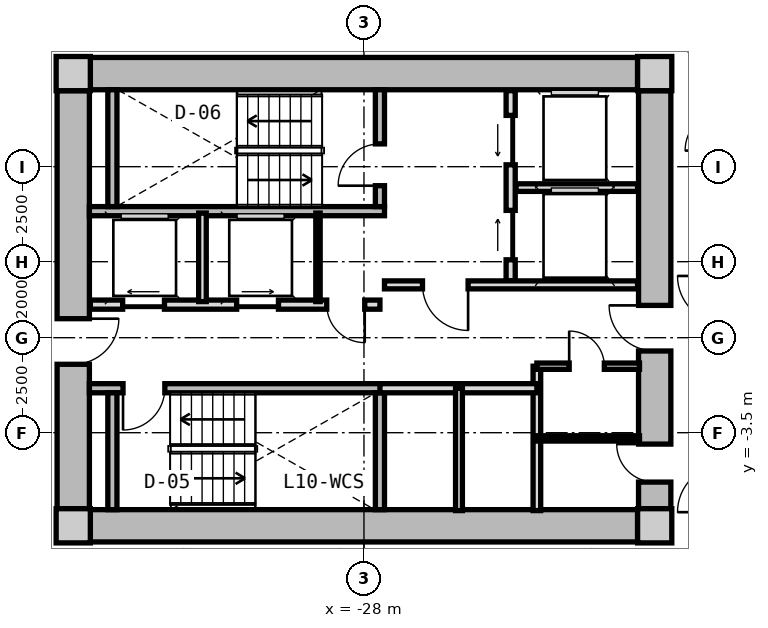
"""IFC4 building model, lengths in metres.
Left out: names, types, materials, properties, quantities, classifications, styles, units other than length and angle.
Written with IfcOpenShell. Run it as: python <this file> out.ifc"""

import sys

from ifc_helpers import new_model, si_unit, direction, frame, frame_2d, origin, origin_2d, place, context, subcontext, project, spatial, rectangle, extrude, source, transform, mapped, element, fill, save


model = new_model("IFC4")
c1 = context("Model", 3, precision=1e-05, world=origin(), true_north=direction((0.0, 1.0)))
c2 = subcontext(c1, "Body", "Model", "MODEL_VIEW")
j1 = project(units=[si_unit("LENGTHUNIT", "METRE"), si_unit("PLANEANGLEUNIT", "RADIAN")], contexts=[c1])
p1 = place(None, origin())
s1 = spatial("IfcSite", under=j1, at=p1, CompositionType="ELEMENT")
p2 = place(p1, origin())
s2 = spatial("IfcBuilding", under=s1, at=p2, CompositionType="ELEMENT")
p3 = place(p2, frame((0.0, 0.0, 36.85)))
s3 = spatial("IfcBuildingStorey", under=s2, at=p3, CompositionType="ELEMENT", Elevation=36.85)
m1 = source(origin(), c2, "Body", "SweptSolid", [
    extrude(rectangle(XDim=0.9, YDim=0.9, at=origin_2d()), origin(), (0.0, 0.0, 1.0), 3.05),
])
for number, where, z_axis, x_axis in (
    (1, (-35.65, -5.95, 0.0), (0.0, 0.0, 1.0), (1.0, 0.0, 0.0)),
    (2, (-20.35, -5.95, 0.0), (0.0, 0.0, 1.0), (1.0, 0.0, 0.0)),
    (3, (-20.35, 5.95, 0.0), (0.0, 0.0, 1.0), (1.0, 0.0, 0.0)),
    (4, (-35.65, 5.95, 0.0), (0.0, 0.0, 1.0), (1.0, 0.0, 0.0)),
):
    element("IfcColumn", number, at=place(p3, frame(where, z_axis=z_axis, x_axis=x_axis)), inside=s3, PredefinedType="COLUMN", context=c2, shape_type="MappedRepresentation", body=[
        mapped(m1, transform((0.0, 0.0, 0.0), x_axis=(1.0, 0.0, 0.0), y_axis=(0.0, 1.0, 0.0), z_axis=(0.0, 0.0, 1.0), scale=1.0)),
    ])
m2 = source(origin(), c2, "Body", "SweptSolid", [
    extrude(rectangle(XDim=14.4, YDim=0.85, at=frame_2d((7.2, 0.0))), origin(), (0.0, 0.0, 1.0), 2.79),
])
for number, where, z_axis, x_axis in (
    (5, (-35.2, 5.95, 0.0), (0.0, 0.0, 1.0), (1.0, 0.0, 0.0)),
    (6, (-20.8, -5.95, 0.0), (0.0, 0.0, 1.0), (-1.0, 0.0, 0.0)),
):
    element("IfcWall", number, at=place(p3, frame(where, z_axis=z_axis, x_axis=x_axis)), inside=s3, PredefinedType="SHEAR", context=c2, shape_type="MappedRepresentation", body=[
        mapped(m2, transform((0.0, 0.0, 0.0), x_axis=(1.0, 0.0, 0.0), y_axis=(0.0, 1.0, 0.0), z_axis=(0.0, 0.0, 1.0), scale=1.0)),
    ])
m3 = source(origin(), c2, "Body", "SweptSolid", [
    extrude(rectangle(XDim=11.0, YDim=0.85, at=frame_2d((5.5, 0.0))), origin(), (0.0, 0.0, 1.0), 2.79),
])
p4 = place(p3, frame((-35.65, -5.5, 0.0), z_axis=(0.0, 0.0, 1.0), x_axis=(0.0, 1.0, 0.0)))
e7 = element("IfcWall", 7, at=p4, inside=s3, PredefinedType="SHEAR", context=c2, shape_type="MappedRepresentation", body=[
    mapped(m3, transform((0.0, 0.0, 0.0), x_axis=(1.0, 0.0, 0.0), y_axis=(0.0, 1.0, 0.0), z_axis=(0.0, 0.0, 1.0), scale=1.0)),
])
p5 = place(p4, frame((3.8, 0.0, 0.0)))
e8 = element("IfcOpeningElement", 8, at=p5, cuts=e7, PredefinedType="OPENING", context=c2, shape_type="SweptSolid", body=[
    extrude(rectangle(XDim=1.2, YDim=2.15, at=frame_2d((0.6, 1.075))), frame((0.0, 0.435, 0.0), z_axis=(0.0, -1.0, 0.0), x_axis=(1.0, 0.0, 0.0)), (0.0, 0.0, 1.0), 0.87),
])
p6 = place(p3, frame((-20.35, 5.5, 0.0), z_axis=(0.0, 0.0, 1.0), x_axis=(0.0, -1.0, 0.0)))
e9 = element("IfcWall", 9, at=p6, inside=s3, PredefinedType="SHEAR", context=c2, shape_type="MappedRepresentation", body=[
    mapped(m3, transform((0.0, 0.0, 0.0), x_axis=(1.0, 0.0, 0.0), y_axis=(0.0, 1.0, 0.0), z_axis=(0.0, 0.0, 1.0), scale=1.0)),
])
p7 = place(p6, frame((5.65, 0.0, 0.0)))
e10 = element("IfcOpeningElement", 10, at=p7, cuts=e9, PredefinedType="OPENING", context=c2, shape_type="SweptSolid", body=[
    extrude(rectangle(XDim=1.2, YDim=2.15, at=frame_2d((0.6, 1.075))), frame((0.0, 0.435, 0.0), z_axis=(0.0, -1.0, 0.0), x_axis=(1.0, 0.0, 0.0)), (0.0, 0.0, 1.0), 0.87),
])
p8 = place(p6, frame((9.3, 0.0, 0.0)))
e11 = element("IfcOpeningElement", 11, at=p8, cuts=e9, PredefinedType="OPENING", context=c2, shape_type="SweptSolid", body=[
    extrude(rectangle(XDim=1.0, YDim=2.1, at=frame_2d((0.5, 1.05))), frame((0.0, 0.435, 0.0), z_axis=(0.0, -1.0, 0.0), x_axis=(1.0, 0.0, 0.0)), (0.0, 0.0, 1.0), 0.87),
])
m4 = source(origin(), c2, "Body", "SweptSolid", [
    extrude(rectangle(XDim=7.765, YDim=0.24, at=frame_2d((3.883, 0.0))), origin(), (0.0, 0.0, 1.0), 2.79),
])
p9 = place(p3, frame((-35.225, 2.33, 0.0), z_axis=(0.0, 0.0, 1.0), x_axis=(1.0, 0.0, 0.0)))
e12 = element("IfcWall", 12, at=p9, inside=s3, PredefinedType="PARTITIONING", context=c2, shape_type="MappedRepresentation", body=[
    mapped(m4, transform((0.0, 0.0, 0.0), x_axis=(1.0, 0.0, 0.0), y_axis=(0.0, 1.0, 0.0), z_axis=(0.0, 0.0, 1.0), scale=1.0)),
])
m5 = source(origin(), c2, "Body", "SweptSolid", [
    extrude(rectangle(XDim=3.075, YDim=0.24, at=frame_2d((1.538, 0.0))), origin(), (0.0, 0.0, 1.0), 2.79),
])
p10 = place(p3, frame((-34.62, 2.45, 0.0), z_axis=(0.0, 0.0, 1.0), x_axis=(0.0, 1.0, 0.0)))
e13 = element("IfcWall", 13, at=p10, inside=s3, PredefinedType="PARTITIONING", context=c2, shape_type="MappedRepresentation", body=[
    mapped(m5, transform((0.0, 0.0, 0.0), x_axis=(1.0, 0.0, 0.0), y_axis=(0.0, 1.0, 0.0), z_axis=(0.0, 0.0, 1.0), scale=1.0)),
])
p11 = place(p3, frame((-27.58, 2.45, 0.0), z_axis=(0.0, 0.0, 1.0), x_axis=(0.0, 1.0, 0.0)))
e14 = element("IfcWall", 14, at=p11, inside=s3, PredefinedType="PARTITIONING", context=c2, shape_type="MappedRepresentation", body=[
    mapped(m5, transform((0.0, 0.0, 0.0), x_axis=(1.0, 0.0, 0.0), y_axis=(0.0, 1.0, 0.0), z_axis=(0.0, 0.0, 1.0), scale=1.0)),
])
p12 = place(p11, frame((0.55, 0.0, 0.0)))
e15 = element("IfcOpeningElement", 15, at=p12, cuts=e14, PredefinedType="OPENING", context=c2, shape_type="SweptSolid", body=[
    extrude(rectangle(XDim=1.1, YDim=2.15, at=frame_2d((0.55, 1.075))), frame((0.0, 0.13, 0.0), z_axis=(0.0, -1.0, 0.0), x_axis=(1.0, 0.0, 0.0)), (0.0, 0.0, 1.0), 0.26),
])
p13 = place(p3, frame((-35.225, -2.33, 0.0), z_axis=(0.0, 0.0, 1.0), x_axis=(1.0, 0.0, 0.0)))
e16 = element("IfcWall", 16, at=p13, inside=s3, PredefinedType="PARTITIONING", context=c2, shape_type="MappedRepresentation", body=[
    mapped(m4, transform((0.0, 0.0, 0.0), x_axis=(1.0, 0.0, 0.0), y_axis=(0.0, 1.0, 0.0), z_axis=(0.0, 0.0, 1.0), scale=1.0)),
])
p14 = place(p13, frame((0.885, 0.0, 0.0)))
e17 = element("IfcOpeningElement", 17, at=p14, cuts=e16, PredefinedType="OPENING", context=c2, shape_type="SweptSolid", body=[
    extrude(rectangle(XDim=1.1, YDim=2.15, at=frame_2d((0.55, 1.075))), frame((0.0, 0.13, 0.0), z_axis=(0.0, -1.0, 0.0), x_axis=(1.0, 0.0, 0.0)), (0.0, 0.0, 1.0), 0.26),
])
for number, where, z_axis, x_axis in (
    (18, (-34.62, -5.525, 0.0), (0.0, 0.0, 1.0), (0.0, 1.0, 0.0)),
    (19, (-27.58, -5.525, 0.0), (0.0, 0.0, 1.0), (0.0, 1.0, 0.0)),
):
    element("IfcWall", number, at=place(p3, frame(where, z_axis=z_axis, x_axis=x_axis)), inside=s3, PredefinedType="PARTITIONING", context=c2, shape_type="MappedRepresentation", body=[
        mapped(m5, transform((0.0, 0.0, 0.0), x_axis=(1.0, 0.0, 0.0), y_axis=(0.0, 1.0, 0.0), z_axis=(0.0, 0.0, 1.0), scale=1.0)),
    ])
m6 = source(origin(), c2, "Body", "SweptSolid", [
    extrude(rectangle(XDim=5.0, YDim=0.24, at=frame_2d((2.5, 0.0))), origin(), (0.0, 0.0, 1.0), 2.775),
])
p15 = place(p3, frame((-24.14, 0.5, 0.0), z_axis=(0.0, 0.0, 1.0), x_axis=(0.0, 1.0, 0.0)))
e20 = element("IfcWall", 20, at=p15, inside=s3, PredefinedType="PARTITIONING", context=c2, shape_type="MappedRepresentation", body=[
    mapped(m6, transform((0.0, 0.0, 0.0), x_axis=(1.0, 0.0, 0.0), y_axis=(0.0, 1.0, 0.0), z_axis=(0.0, 0.0, 1.0), scale=1.0)),
])
p16 = place(p15, frame((3.05, 0.0, 0.0)))
e21 = element("IfcOpeningElement", 21, at=p16, cuts=e20, PredefinedType="OPENING", context=c2, shape_type="SweptSolid", body=[
    extrude(rectangle(XDim=1.3, YDim=2.2, at=frame_2d((0.65, 1.1))), frame((0.0, 0.13, 0.0), z_axis=(0.0, -1.0, 0.0), x_axis=(1.0, 0.0, 0.0)), (0.0, 0.0, 1.0), 0.26),
])
p17 = place(p15, frame((0.55, 0.0, 0.0)))
e22 = element("IfcOpeningElement", 22, at=p17, cuts=e20, PredefinedType="OPENING", context=c2, shape_type="SweptSolid", body=[
    extrude(rectangle(XDim=1.3, YDim=2.2, at=frame_2d((0.65, 1.1))), frame((0.0, 0.13, 0.0), z_axis=(0.0, -1.0, 0.0), x_axis=(1.0, 0.0, 0.0)), (0.0, 0.0, 1.0), 0.26),
])
m7 = source(origin(), c2, "Body", "SweptSolid", [
    extrude(rectangle(XDim=3.2, YDim=0.2, at=frame_2d((1.6, 0.0))), origin(), (0.0, 0.0, 1.0), 2.775),
])
p18 = place(p3, frame((-24.0, 2.95, 0.0), z_axis=(0.0, 0.0, 1.0), x_axis=(1.0, 0.0, 0.0)))
e23 = element("IfcWall", 23, at=p18, inside=s3, PredefinedType="PARTITIONING", context=c2, shape_type="MappedRepresentation", body=[
    mapped(m7, transform((0.0, 0.0, 0.0), x_axis=(1.0, 0.0, 0.0), y_axis=(0.0, 1.0, 0.0), z_axis=(0.0, 0.0, 1.0), scale=1.0)),
])
m8 = source(origin(), c2, "Body", "SweptSolid", [
    extrude(rectangle(XDim=6.66, YDim=0.21, at=frame_2d((3.33, 0.0))), origin(), (0.0, 0.0, 1.0), 2.775),
])
p19 = place(p3, frame((-27.46, 0.39, 0.0), z_axis=(0.0, 0.0, 1.0), x_axis=(1.0, 0.0, 0.0)))
e24 = element("IfcWall", 24, at=p19, inside=s3, PredefinedType="PARTITIONING", context=c2, shape_type="MappedRepresentation", body=[
    mapped(m8, transform((0.0, 0.0, 0.0), x_axis=(1.0, 0.0, 0.0), y_axis=(0.0, 1.0, 0.0), z_axis=(0.0, 0.0, 1.0), scale=1.0)),
])
p20 = place(p19, frame((1.0, 0.0, 0.0)))
e25 = element("IfcOpeningElement", 25, at=p20, cuts=e24, PredefinedType="OPENING", context=c2, shape_type="SweptSolid", body=[
    extrude(rectangle(XDim=1.2, YDim=2.15, at=frame_2d((0.6, 1.075))), frame((0.0, 0.115, 0.0), z_axis=(0.0, -1.0, 0.0), x_axis=(1.0, 0.0, 0.0)), (0.0, 0.0, 1.0), 0.23),
])
m9 = source(origin(), c2, "Body", "SweptSolid", [
    extrude(rectangle(XDim=7.62, YDim=0.24, at=frame_2d((3.81, 0.0))), origin(), (0.0, 0.0, 1.0), 2.775),
])
p21 = place(p3, frame((-35.2, -0.13, 0.0), z_axis=(0.0, 0.0, 1.0), x_axis=(1.0, 0.0, 0.0)))
e26 = element("IfcWall", 26, at=p21, inside=s3, PredefinedType="PARTITIONING", context=c2, shape_type="MappedRepresentation", body=[
    mapped(m9, transform((0.0, 0.0, 0.0), x_axis=(1.0, 0.0, 0.0), y_axis=(0.0, 1.0, 0.0), z_axis=(0.0, 0.0, 1.0), scale=1.0)),
])
p22 = place(p21, frame((6.22, 0.0, 0.0)))
e27 = element("IfcOpeningElement", 27, at=p22, cuts=e26, PredefinedType="OPENING", context=c2, shape_type="SweptSolid", body=[
    extrude(rectangle(XDim=1.0, YDim=2.1, at=frame_2d((0.5, 1.05))), frame((0.0, 0.13, 0.0), z_axis=(0.0, -1.0, 0.0), x_axis=(1.0, 0.0, 0.0)), (0.0, 0.0, 1.0), 0.26),
])
p23 = place(p21, frame((0.85, 0.0, 0.0)))
e28 = element("IfcOpeningElement", 28, at=p23, cuts=e26, PredefinedType="OPENING", context=c2, shape_type="SweptSolid", body=[
    extrude(rectangle(XDim=1.1, YDim=2.2, at=frame_2d((0.55, 1.1))), frame((0.0, 0.13, 0.0), z_axis=(0.0, -1.0, 0.0), x_axis=(1.0, 0.0, 0.0)), (0.0, 0.0, 1.0), 0.26),
])
p24 = place(p21, frame((3.85, 0.0, 0.0)))
e29 = element("IfcOpeningElement", 29, at=p24, cuts=e26, PredefinedType="OPENING", context=c2, shape_type="SweptSolid", body=[
    extrude(rectangle(XDim=1.1, YDim=2.2, at=frame_2d((0.55, 1.1))), frame((0.0, 0.13, 0.0), z_axis=(0.0, -1.0, 0.0), x_axis=(1.0, 0.0, 0.0)), (0.0, 0.0, 1.0), 0.26),
])
m10 = source(origin(), c2, "Body", "SweptSolid", [
    extrude(rectangle(XDim=2.33, YDim=0.115, at=frame_2d((1.165, 0.0))), origin(), (0.0, 0.0, 1.0), 2.775),
])
p25 = place(p3, frame((-29.21, -0.05, 0.0), z_axis=(0.0, 0.0, 1.0), x_axis=(0.0, 1.0, 0.0)))
e30 = element("IfcWall", 30, at=p25, inside=s3, PredefinedType="PARTITIONING", context=c2, shape_type="MappedRepresentation", body=[
    mapped(m10, transform((0.0, 0.0, 0.0), x_axis=(1.0, 0.0, 0.0), y_axis=(0.0, 1.0, 0.0), z_axis=(0.0, 0.0, 1.0), scale=1.0)),
])
m11 = source(origin(), c2, "Body", "SweptSolid", [
    extrude(rectangle(XDim=2.33, YDim=0.2, at=frame_2d((1.165, 0.0))), origin(), (0.0, 0.0, 1.0), 2.775),
])
p26 = place(p3, frame((-32.25, -0.05, 0.0), z_axis=(0.0, 0.0, 1.0), x_axis=(0.0, 1.0, 0.0)))
e31 = element("IfcWall", 31, at=p26, inside=s3, PredefinedType="PARTITIONING", context=c2, shape_type="MappedRepresentation", body=[
    mapped(m11, transform((0.0, 0.0, 0.0), x_axis=(1.0, 0.0, 0.0), y_axis=(0.0, 1.0, 0.0), z_axis=(0.0, 0.0, 1.0), scale=1.0)),
])
m12 = source(origin(), c2, "Body", "SweptSolid", [
    extrude(rectangle(XDim=3.8, YDim=0.2, at=frame_2d((1.9, 0.0))), origin(), (0.0, 0.0, 1.0), 2.775),
])
p27 = place(p3, frame((-23.45, -5.55, 0.0), z_axis=(0.0, 0.0, 1.0), x_axis=(0.0, 1.0, 0.0)))
e32 = element("IfcWall", 32, at=p27, inside=s3, PredefinedType="PARTITIONING", context=c2, shape_type="MappedRepresentation", body=[
    mapped(m12, transform((0.0, 0.0, 0.0), x_axis=(1.0, 0.0, 0.0), y_axis=(0.0, 1.0, 0.0), z_axis=(0.0, 0.0, 1.0), scale=1.0)),
])
m13 = source(origin(), c2, "Body", "SweptSolid", [
    extrude(rectangle(XDim=4.13, YDim=0.24, at=frame_2d((2.065, 0.0))), origin(), (0.0, 0.0, 1.0), 2.775),
])
p28 = place(p3, frame((-27.58, -2.33, 0.0), z_axis=(0.0, 0.0, 1.0), x_axis=(1.0, 0.0, 0.0)))
e33 = element("IfcWall", 33, at=p28, inside=s3, PredefinedType="PARTITIONING", context=c2, shape_type="MappedRepresentation", body=[
    mapped(m13, transform((0.0, 0.0, 0.0), x_axis=(1.0, 0.0, 0.0), y_axis=(0.0, 1.0, 0.0), z_axis=(0.0, 0.0, 1.0), scale=1.0)),
])
m14 = source(origin(), c2, "Body", "SweptSolid", [
    extrude(rectangle(XDim=3.22, YDim=0.18, at=frame_2d((1.61, 0.0))), origin(), (0.0, 0.0, 1.0), 2.775),
])
p29 = place(p3, frame((-25.5, -5.55, 0.0), z_axis=(0.0, 0.0, 1.0), x_axis=(0.0, 1.0, 0.0)))
e34 = element("IfcWall", 34, at=p29, inside=s3, PredefinedType="PARTITIONING", context=c2, shape_type="MappedRepresentation", body=[
    mapped(m14, transform((0.0, 0.0, 0.0), x_axis=(1.0, 0.0, 0.0), y_axis=(0.0, 1.0, 0.0), z_axis=(0.0, 0.0, 1.0), scale=1.0)),
])
m15 = source(origin(), c2, "Body", "SweptSolid", [
    extrude(rectangle(XDim=2.7, YDim=0.165, at=frame_2d((1.35, 0.0))), origin(), (0.0, 0.0, 1.0), 2.775),
])
p30 = place(p3, frame((-23.45, -1.75, 0.0), z_axis=(0.0, 0.0, 1.0), x_axis=(1.0, 0.0, 0.0)))
e35 = element("IfcWall", 35, at=p30, inside=s3, PredefinedType="PARTITIONING", context=c2, shape_type="MappedRepresentation", body=[
    mapped(m15, transform((0.0, 0.0, 0.0), x_axis=(1.0, 0.0, 0.0), y_axis=(0.0, 1.0, 0.0), z_axis=(0.0, 0.0, 1.0), scale=1.0)),
])
p31 = place(p30, frame((0.85, 0.0, 0.0)))
e36 = element("IfcOpeningElement", 36, at=p31, cuts=e35, PredefinedType="OPENING", context=c2, shape_type="SweptSolid", body=[
    extrude(rectangle(XDim=0.925, YDim=2.1, at=frame_2d((0.462, 1.05))), frame((0.0, 0.093, 0.0), z_axis=(0.0, -1.0, 0.0), x_axis=(1.0, 0.0, 0.0)), (0.0, 0.0, 1.0), 0.185),
])
m16 = source(origin(), c2, "Body", "SweptSolid", [
    extrude(rectangle(XDim=2.7, YDim=0.14, at=frame_2d((1.35, 0.0))), origin(), (0.0, 0.0, 1.0), 2.775),
])
p32 = place(p3, frame((-23.45, -3.65, 0.0), z_axis=(0.0, 0.0, 1.0), x_axis=(1.0, 0.0, 0.0)))
e37 = element("IfcWall", 37, at=p32, inside=s3, PredefinedType="PARTITIONING", context=c2, shape_type="MappedRepresentation", body=[
    mapped(m16, transform((0.0, 0.0, 0.0), x_axis=(1.0, 0.0, 0.0), y_axis=(0.0, 1.0, 0.0), z_axis=(0.0, 0.0, 1.0), scale=1.0)),
])
m17 = source(origin(), c2, "Body", "SweptSolid", [
    extrude(rectangle(XDim=1.1, YDim=2.15, at=frame_2d((0.55, 1.075))), frame((0.0, 0.025, 0.0), z_axis=(0.0, -1.0, 0.0), x_axis=(1.0, 0.0, 0.0)), (0.0, 0.0, 1.0), 0.05),
])
p33 = place(p12, origin())
e38 = element("IfcDoor", 38, at=p33, inside=s3, OperationType="SINGLE_SWING_LEFT", PredefinedType="DOOR", context=c2, shape_type="MappedRepresentation", body=[
    mapped(m17, transform((0.0, 0.0, 0.0), x_axis=(1.0, 0.0, 0.0), y_axis=(0.0, 1.0, 0.0), z_axis=(0.0, 0.0, 1.0), scale=1.0)),
])
fill(e15, e38)
p34 = place(p14, frame((1.1, 0.0, 0.0), z_axis=(0.0, 0.0, 1.0), x_axis=(-1.0, 0.0, 0.0)))
e39 = element("IfcDoor", 39, at=p34, inside=s3, OperationType="SINGLE_SWING_RIGHT", PredefinedType="DOOR", context=c2, shape_type="MappedRepresentation", body=[
    mapped(m17, transform((0.0, 0.0, 0.0), x_axis=(1.0, 0.0, 0.0), y_axis=(0.0, 1.0, 0.0), z_axis=(0.0, 0.0, 1.0), scale=1.0)),
])
fill(e17, e39)
m18 = source(origin(), c2, "Body", "SweptSolid", [
    extrude(rectangle(XDim=1.3, YDim=2.2, at=frame_2d((0.65, 1.1))), frame((0.0, 0.025, 0.0), z_axis=(0.0, -1.0, 0.0), x_axis=(1.0, 0.0, 0.0)), (0.0, 0.0, 1.0), 0.05),
])
p35 = place(p16, origin())
e40 = element("IfcDoor", 40, at=p35, inside=s3, OperationType="SLIDING_TO_LEFT", PredefinedType="DOOR", context=c2, shape_type="MappedRepresentation", body=[
    mapped(m18, transform((0.0, 0.0, 0.0), x_axis=(1.0, 0.0, 0.0), y_axis=(0.0, 1.0, 0.0), z_axis=(0.0, 0.0, 1.0), scale=1.0)),
])
fill(e21, e40)
p36 = place(p17, origin())
e41 = element("IfcDoor", 41, at=p36, inside=s3, OperationType="SLIDING_TO_RIGHT", PredefinedType="DOOR", context=c2, shape_type="MappedRepresentation", body=[
    mapped(m18, transform((0.0, 0.0, 0.0), x_axis=(1.0, 0.0, 0.0), y_axis=(0.0, 1.0, 0.0), z_axis=(0.0, 0.0, 1.0), scale=1.0)),
])
fill(e22, e41)
m19 = source(origin(), c2, "Body", "SweptSolid", [
    extrude(rectangle(XDim=1.2, YDim=2.15, at=frame_2d((0.6, 1.075))), frame((0.0, 0.025, 0.0), z_axis=(0.0, -1.0, 0.0), x_axis=(1.0, 0.0, 0.0)), (0.0, 0.0, 1.0), 0.05),
])
p37 = place(p20, frame((1.2, 0.0, 0.0), z_axis=(0.0, 0.0, 1.0), x_axis=(-1.0, 0.0, 0.0)))
e42 = element("IfcDoor", 42, at=p37, inside=s3, OperationType="SINGLE_SWING_LEFT", PredefinedType="DOOR", context=c2, shape_type="MappedRepresentation", body=[
    mapped(m19, transform((0.0, 0.0, 0.0), x_axis=(1.0, 0.0, 0.0), y_axis=(0.0, 1.0, 0.0), z_axis=(0.0, 0.0, 1.0), scale=1.0)),
])
fill(e25, e42)
p38 = place(p5, frame((1.2, 0.0, 0.0), z_axis=(0.0, 0.0, 1.0), x_axis=(-1.0, 0.0, 0.0)))
e43 = element("IfcDoor", 43, at=p38, inside=s3, OperationType="SINGLE_SWING_LEFT", PredefinedType="DOOR", context=c2, shape_type="MappedRepresentation", body=[
    mapped(m19, transform((0.0, 0.0, 0.0), x_axis=(1.0, 0.0, 0.0), y_axis=(0.0, 1.0, 0.0), z_axis=(0.0, 0.0, 1.0), scale=1.0)),
])
fill(e8, e43)
p39 = place(p7, frame((1.2, 0.0, 0.0), z_axis=(0.0, 0.0, 1.0), x_axis=(-1.0, 0.0, 0.0)))
e44 = element("IfcDoor", 44, at=p39, inside=s3, OperationType="SINGLE_SWING_RIGHT", PredefinedType="DOOR", context=c2, shape_type="MappedRepresentation", body=[
    mapped(m19, transform((0.0, 0.0, 0.0), x_axis=(1.0, 0.0, 0.0), y_axis=(0.0, 1.0, 0.0), z_axis=(0.0, 0.0, 1.0), scale=1.0)),
])
fill(e10, e44)
m20 = source(origin(), c2, "Body", "SweptSolid", [
    extrude(rectangle(XDim=1.0, YDim=2.1, at=frame_2d((0.5, 1.05))), frame((0.0, 0.025, 0.0), z_axis=(0.0, -1.0, 0.0), x_axis=(1.0, 0.0, 0.0)), (0.0, 0.0, 1.0), 0.05),
])
p40 = place(p22, frame((1.0, 0.0, 0.0), z_axis=(0.0, 0.0, 1.0), x_axis=(-1.0, 0.0, 0.0)))
e45 = element("IfcDoor", 45, at=p40, inside=s3, OperationType="SINGLE_SWING_LEFT", PredefinedType="DOOR", context=c2, shape_type="MappedRepresentation", body=[
    mapped(m20, transform((0.0, 0.0, 0.0), x_axis=(1.0, 0.0, 0.0), y_axis=(0.0, 1.0, 0.0), z_axis=(0.0, 0.0, 1.0), scale=1.0)),
])
fill(e27, e45)
m21 = source(origin(), c2, "Body", "SweptSolid", [
    extrude(rectangle(XDim=1.1, YDim=2.2, at=frame_2d((0.55, 1.1))), frame((0.0, 0.025, 0.0), z_axis=(0.0, -1.0, 0.0), x_axis=(1.0, 0.0, 0.0)), (0.0, 0.0, 1.0), 0.05),
])
p41 = place(p23, origin())
e46 = element("IfcDoor", 46, at=p41, inside=s3, OperationType="SLIDING_TO_LEFT", PredefinedType="DOOR", context=c2, shape_type="MappedRepresentation", body=[
    mapped(m21, transform((0.0, 0.0, 0.0), x_axis=(1.0, 0.0, 0.0), y_axis=(0.0, 1.0, 0.0), z_axis=(0.0, 0.0, 1.0), scale=1.0)),
])
fill(e28, e46)
p42 = place(p24, origin())
e47 = element("IfcDoor", 47, at=p42, inside=s3, OperationType="SLIDING_TO_RIGHT", PredefinedType="DOOR", context=c2, shape_type="MappedRepresentation", body=[
    mapped(m21, transform((0.0, 0.0, 0.0), x_axis=(1.0, 0.0, 0.0), y_axis=(0.0, 1.0, 0.0), z_axis=(0.0, 0.0, 1.0), scale=1.0)),
])
fill(e29, e47)
m22 = source(origin(), c2, "Body", "SweptSolid", [
    extrude(rectangle(XDim=0.925, YDim=2.1, at=frame_2d((0.462, 1.05))), frame((0.0, 0.025, 0.0), z_axis=(0.0, -1.0, 0.0), x_axis=(1.0, 0.0, 0.0)), (0.0, 0.0, 1.0), 0.05),
])
p43 = place(p31, origin())
e48 = element("IfcDoor", 48, at=p43, inside=s3, OperationType="SINGLE_SWING_LEFT", PredefinedType="DOOR", context=c2, shape_type="MappedRepresentation", body=[
    mapped(m22, transform((0.0, 0.0, 0.0), x_axis=(1.0, 0.0, 0.0), y_axis=(0.0, 1.0, 0.0), z_axis=(0.0, 0.0, 1.0), scale=1.0)),
])
fill(e36, e48)
p44 = place(p8, frame((1.0, 0.0, 0.0), z_axis=(0.0, 0.0, 1.0), x_axis=(-1.0, 0.0, 0.0)))
e49 = element("IfcDoor", 49, at=p44, inside=s3, OperationType="SINGLE_SWING_RIGHT", PredefinedType="DOOR", context=c2, shape_type="MappedRepresentation", body=[
    mapped(m20, transform((0.0, 0.0, 0.0), x_axis=(1.0, 0.0, 0.0), y_axis=(0.0, 1.0, 0.0), z_axis=(0.0, 0.0, 1.0), scale=1.0)),
])
fill(e11, e49)
save(model, sys.argv[1])
